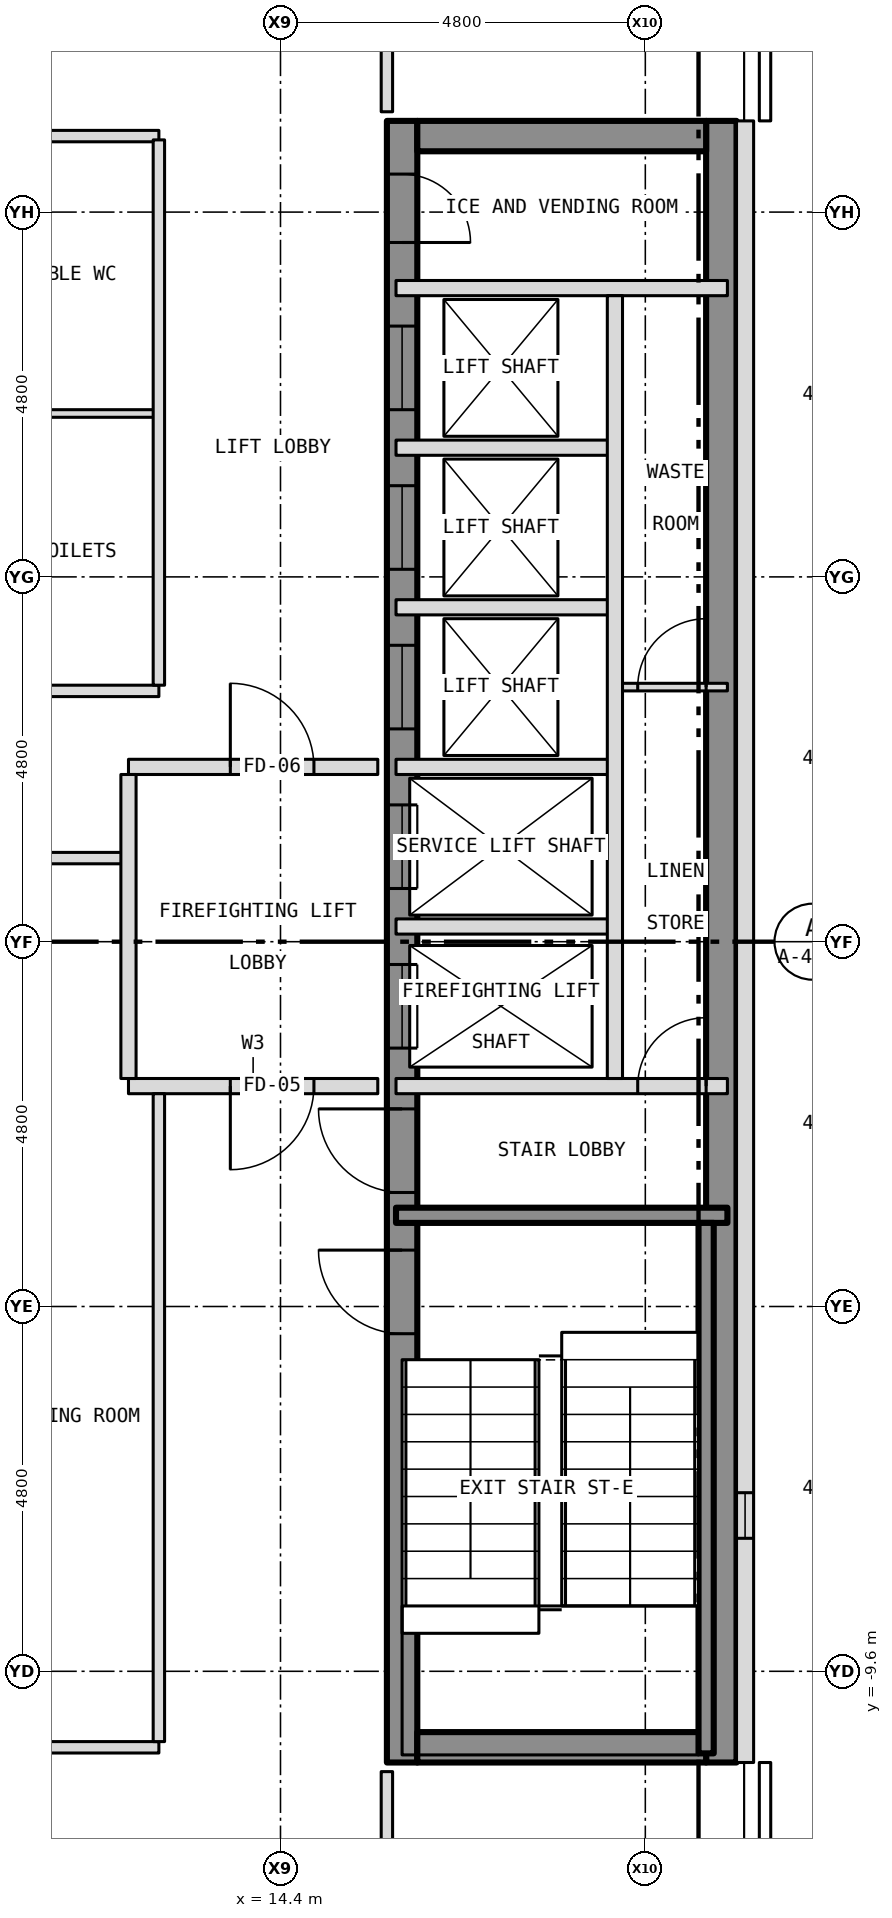
"""IFC4 building model, lengths in metres.
Left out: names, types, materials, properties, quantities, classifications, styles, units other than length and angle.
Written with IfcOpenShell. Run it as: python <this file> out.ifc"""

import sys

from ifc_helpers import new_model, si_unit, direction, frame, frame_2d, origin, place, context, subcontext, project, spatial, rectangle, extrude, element, fill, save


model = new_model("IFC4")
c1 = context("Model", 3, precision=1e-05, world=origin(), true_north=direction((0.0, 1.0)))
c2 = subcontext(c1, "Body", "Model", "MODEL_VIEW")
j1 = project(units=[si_unit("LENGTHUNIT", "METRE"), si_unit("PLANEANGLEUNIT", "RADIAN")], contexts=[c1])
p1 = place(None, origin())
s1 = spatial("IfcSite", under=j1, at=p1, CompositionType="ELEMENT")
p2 = place(p1, origin())
s2 = spatial("IfcBuilding", under=s1, at=p2, CompositionType="ELEMENT")
p3 = place(p2, frame((0.0, 0.0, 241.0)))
s3 = spatial("IfcBuildingStorey", under=s2, at=p3, CompositionType="ELEMENT", Elevation=241.0)
p4 = place(p3, frame((16.0, -10.8, 0.0), z_axis=(0.0, 0.0, 1.0), x_axis=(0.0, 1.0, 0.0)))
e1 = element("IfcWall", 1, at=p4, inside=s3, PredefinedType="SHEAR", context=c2, shape_type="SweptSolid", body=[
    extrude(rectangle(XDim=21.6, YDim=0.4, at=frame_2d((10.8, 0.0))), origin(), (0.0, 0.0, 1.0), 3.25),
])
p5 = place(p4, frame((9.4, 0.0, 0.0)))
e2 = element("IfcOpeningElement", 2, at=p5, cuts=e1, PredefinedType="OPENING", context=c2, shape_type="SweptSolid", body=[
    extrude(rectangle(XDim=1.1, YDim=2.1, at=frame_2d((0.55, 1.05))), frame((0.0, 0.212, 0.0), z_axis=(0.0, -1.0, 0.0), x_axis=(1.0, 0.0, 0.0)), (0.0, 0.0, 1.0), 0.424),
])
p6 = place(p4, frame((11.5, 0.0, 0.0)))
e3 = element("IfcOpeningElement", 3, at=p6, cuts=e1, PredefinedType="OPENING", context=c2, shape_type="SweptSolid", body=[
    extrude(rectangle(XDim=1.1, YDim=2.1, at=frame_2d((0.55, 1.05))), frame((0.0, 0.212, 0.0), z_axis=(0.0, -1.0, 0.0), x_axis=(1.0, 0.0, 0.0)), (0.0, 0.0, 1.0), 0.424),
])
p7 = place(p4, frame((13.6, 0.0, 0.0)))
e4 = element("IfcOpeningElement", 4, at=p7, cuts=e1, PredefinedType="OPENING", context=c2, shape_type="SweptSolid", body=[
    extrude(rectangle(XDim=1.1, YDim=2.1, at=frame_2d((0.55, 1.05))), frame((0.0, 0.212, 0.0), z_axis=(0.0, -1.0, 0.0), x_axis=(1.0, 0.0, 0.0)), (0.0, 0.0, 1.0), 0.424),
])
p8 = place(p4, frame((15.7, 0.0, 0.0)))
e5 = element("IfcOpeningElement", 5, at=p8, cuts=e1, PredefinedType="OPENING", context=c2, shape_type="SweptSolid", body=[
    extrude(rectangle(XDim=1.1, YDim=2.1, at=frame_2d((0.55, 1.05))), frame((0.0, 0.212, 0.0), z_axis=(0.0, -1.0, 0.0), x_axis=(1.0, 0.0, 0.0)), (0.0, 0.0, 1.0), 0.424),
])
p9 = place(p4, frame((17.8, 0.0, 0.0)))
e6 = element("IfcOpeningElement", 6, at=p9, cuts=e1, PredefinedType="OPENING", context=c2, shape_type="SweptSolid", body=[
    extrude(rectangle(XDim=1.1, YDim=2.1, at=frame_2d((0.55, 1.05))), frame((0.0, 0.212, 0.0), z_axis=(0.0, -1.0, 0.0), x_axis=(1.0, 0.0, 0.0)), (0.0, 0.0, 1.0), 0.424),
])
p10 = place(p4, frame((5.642, 0.0, 0.0)))
e7 = element("IfcOpeningElement", 7, at=p10, cuts=e1, PredefinedType="OPENING", context=c2, shape_type="SweptSolid", body=[
    extrude(rectangle(XDim=1.1, YDim=2.1, at=frame_2d((0.55, 1.05))), frame((0.0, 0.212, 0.0), z_axis=(0.0, -1.0, 0.0), x_axis=(1.0, 0.0, 0.0)), (0.0, 0.0, 1.0), 0.424),
])
p11 = place(p4, frame((7.5, 0.0, 0.0)))
e8 = element("IfcOpeningElement", 8, at=p11, cuts=e1, PredefinedType="OPENING", context=c2, shape_type="SweptSolid", body=[
    extrude(rectangle(XDim=1.1, YDim=2.1, at=frame_2d((0.55, 1.05))), frame((0.0, 0.212, 0.0), z_axis=(0.0, -1.0, 0.0), x_axis=(1.0, 0.0, 0.0)), (0.0, 0.0, 1.0), 0.424),
])
p12 = place(p4, frame((20.0, 0.0, 0.0)))
e9 = element("IfcOpeningElement", 9, at=p12, cuts=e1, PredefinedType="OPENING", context=c2, shape_type="SweptSolid", body=[
    extrude(rectangle(XDim=0.9, YDim=2.1, at=frame_2d((0.45, 1.05))), frame((0.0, 0.212, 0.0), z_axis=(0.0, -1.0, 0.0), x_axis=(1.0, 0.0, 0.0)), (0.0, 0.0, 1.0), 0.424),
])
p13 = place(p3, frame((20.2, -10.8, 0.0), z_axis=(0.0, 0.0, 1.0), x_axis=(0.0, 1.0, 0.0)))
e10 = element("IfcWall", 10, at=p13, inside=s3, PredefinedType="SHEAR", context=c2, shape_type="SweptSolid", body=[
    extrude(rectangle(XDim=21.6, YDim=0.4, at=frame_2d((10.8, 0.0))), origin(), (0.0, 0.0, 1.0), 3.25),
])
for number, where, z_axis, x_axis in (
    (11, (16.2, 10.6, 0.0), (0.0, 0.0, 1.0), (1.0, 0.0, 0.0)),
    (12, (16.2, -10.6, 0.0), (0.0, 0.0, 1.0), (1.0, 0.0, 0.0)),
):
    element("IfcWall", number, at=place(p3, frame(where, z_axis=z_axis, x_axis=x_axis)), inside=s3, PredefinedType="SHEAR", context=c2, shape_type="SweptSolid", body=[
        extrude(rectangle(XDim=3.8, YDim=0.4, at=frame_2d((1.9, 0.0))), origin(), (0.0, 0.0, 1.0), 3.25),
    ])
p14 = place(p3, frame((20.512, -10.8, 0.0), z_axis=(0.0, 0.0, 1.0), x_axis=(0.0, 1.0, 0.0)))
e13 = element("IfcWall", 13, at=p14, inside=s3, PredefinedType="SOLIDWALL", context=c2, shape_type="SweptSolid", body=[
    extrude(rectangle(XDim=21.6, YDim=0.225, at=frame_2d((10.8, 0.0))), origin(), (0.0, 0.0, 1.0), 3.5),
])
p15 = place(p14, frame((2.95, 0.0, 1.0)))
e14 = element("IfcOpeningElement", 14, at=p15, cuts=e13, PredefinedType="OPENING", context=c2, shape_type="SweptSolid", body=[
    extrude(rectangle(XDim=0.6, YDim=1.5, at=frame_2d((0.3, 0.75))), frame((0.0, 0.125, 0.0), z_axis=(0.0, -1.0, 0.0), x_axis=(1.0, 0.0, 0.0)), (0.0, 0.0, 1.0), 0.249),
])
p16 = place(p3, frame((9.7, -10.6, 0.0), z_axis=(0.0, 0.0, 1.0), x_axis=(1.0, 0.0, 0.0)))
e15 = element("IfcWall", 15, at=p16, inside=s3, PredefinedType="PARTITIONING", context=c2, shape_type="SweptSolid", body=[
    extrude(rectangle(XDim=3.1, YDim=0.15, at=frame_2d((1.55, 0.0))), origin(), (0.0, 0.0, 1.0), 3.35),
])
p17 = place(p3, frame((15.92, -3.6, 0.0), z_axis=(0.0, 0.0, 1.0), x_axis=(1.0, 0.0, 0.0)))
e16 = element("IfcWall", 16, at=p17, inside=s3, PredefinedType="SHEAR", context=c2, shape_type="SweptSolid", body=[
    extrude(rectangle(XDim=4.36, YDim=0.2, at=frame_2d((2.18, 0.0))), origin(), (0.0, 0.0, 1.0), 3.25),
])
p18 = place(p3, frame((12.4, -1.9, 0.0), z_axis=(0.0, 0.0, 1.0), x_axis=(1.0, 0.0, 0.0)))
e17 = element("IfcWall", 17, at=p18, inside=s3, PredefinedType="PARTITIONING", context=c2, shape_type="SweptSolid", body=[
    extrude(rectangle(XDim=3.28, YDim=0.2, at=frame_2d((1.64, 0.0))), origin(), (0.0, 0.0, 1.0), 3.35),
])
p19 = place(p18, frame((1.34, 0.0, 0.0)))
e18 = element("IfcOpeningElement", 18, at=p19, cuts=e17, PredefinedType="OPENING", context=c2, shape_type="SweptSolid", body=[
    extrude(rectangle(XDim=1.1, YDim=2.1, at=frame_2d((0.55, 1.05))), frame((0.0, 0.112, 0.0), z_axis=(0.0, -1.0, 0.0), x_axis=(1.0, 0.0, 0.0)), (0.0, 0.0, 1.0), 0.224),
])
p20 = place(p3, frame((15.92, -1.9, 0.0), z_axis=(0.0, 0.0, 1.0), x_axis=(1.0, 0.0, 0.0)))
e19 = element("IfcWall", 19, at=p20, inside=s3, PredefinedType="PARTITIONING", context=c2, shape_type="SweptSolid", body=[
    extrude(rectangle(XDim=4.36, YDim=0.2, at=frame_2d((2.18, 0.0))), origin(), (0.0, 0.0, 1.0), 3.25),
])
p21 = place(p20, frame((3.18, 0.0, 0.0)))
e20 = element("IfcOpeningElement", 20, at=p21, cuts=e19, PredefinedType="OPENING", context=c2, shape_type="SweptSolid", body=[
    extrude(rectangle(XDim=0.9, YDim=2.1, at=frame_2d((0.45, 1.05))), frame((0.0, 0.112, 0.0), z_axis=(0.0, -1.0, 0.0), x_axis=(1.0, 0.0, 0.0)), (0.0, 0.0, 1.0), 0.224),
])
p22 = place(p3, frame((15.92, 0.2, 0.0), z_axis=(0.0, 0.0, 1.0), x_axis=(1.0, 0.0, 0.0)))
e21 = element("IfcWall", 21, at=p22, inside=s3, PredefinedType="PARTITIONING", context=c2, shape_type="SweptSolid", body=[
    extrude(rectangle(XDim=2.88, YDim=0.2, at=frame_2d((1.44, 0.0))), origin(), (0.0, 0.0, 1.0), 3.25),
])
p23 = place(p3, frame((9.7, 1.1, 0.0), z_axis=(0.0, 0.0, 1.0), x_axis=(1.0, 0.0, 0.0)))
e22 = element("IfcWall", 22, at=p23, inside=s3, PredefinedType="PARTITIONING", context=c2, shape_type="SweptSolid", body=[
    extrude(rectangle(XDim=2.7, YDim=0.15, at=frame_2d((1.35, 0.0))), origin(), (0.0, 0.0, 1.0), 3.35),
])
p24 = place(p3, frame((12.4, 2.3, 0.0), z_axis=(0.0, 0.0, 1.0), x_axis=(1.0, 0.0, 0.0)))
e23 = element("IfcWall", 23, at=p24, inside=s3, PredefinedType="PARTITIONING", context=c2, shape_type="SweptSolid", body=[
    extrude(rectangle(XDim=3.28, YDim=0.2, at=frame_2d((1.64, 0.0))), origin(), (0.0, 0.0, 1.0), 3.35),
])
p25 = place(p24, frame((1.34, 0.0, 0.0)))
e24 = element("IfcOpeningElement", 24, at=p25, cuts=e23, PredefinedType="OPENING", context=c2, shape_type="SweptSolid", body=[
    extrude(rectangle(XDim=1.1, YDim=2.1, at=frame_2d((0.55, 1.05))), frame((0.0, 0.112, 0.0), z_axis=(0.0, -1.0, 0.0), x_axis=(1.0, 0.0, 0.0)), (0.0, 0.0, 1.0), 0.224),
])
p26 = place(p3, frame((15.92, 2.3, 0.0), z_axis=(0.0, 0.0, 1.0), x_axis=(1.0, 0.0, 0.0)))
e25 = element("IfcWall", 25, at=p26, inside=s3, PredefinedType="PARTITIONING", context=c2, shape_type="SweptSolid", body=[
    extrude(rectangle(XDim=2.88, YDim=0.2, at=frame_2d((1.44, 0.0))), origin(), (0.0, 0.0, 1.0), 3.25),
])
p27 = place(p3, frame((9.7, 3.3, 0.0), z_axis=(0.0, 0.0, 1.0), x_axis=(1.0, 0.0, 0.0)))
e26 = element("IfcWall", 26, at=p27, inside=s3, PredefinedType="PARTITIONING", context=c2, shape_type="SweptSolid", body=[
    extrude(rectangle(XDim=3.1, YDim=0.15, at=frame_2d((1.55, 0.0))), origin(), (0.0, 0.0, 1.0), 3.35),
])
p28 = place(p3, frame((18.8, 3.35, 0.0), z_axis=(0.0, 0.0, 1.0), x_axis=(1.0, 0.0, 0.0)))
e27 = element("IfcWall", 27, at=p28, inside=s3, PredefinedType="PARTITIONING", context=c2, shape_type="SweptSolid", body=[
    extrude(rectangle(XDim=1.48, YDim=0.1, at=frame_2d((0.74, 0.0))), origin(), (0.0, 0.0, 1.0), 3.25),
])
p29 = place(p28, frame((0.3, 0.0, 0.0)))
e28 = element("IfcOpeningElement", 28, at=p29, cuts=e27, PredefinedType="OPENING", context=c2, shape_type="SweptSolid", body=[
    extrude(rectangle(XDim=0.9, YDim=2.1, at=frame_2d((0.45, 1.05))), frame((0.0, 0.062, 0.0), z_axis=(0.0, -1.0, 0.0), x_axis=(1.0, 0.0, 0.0)), (0.0, 0.0, 1.0), 0.124),
])
for number, where, z_axis, x_axis in (
    (29, (15.92, 4.4, 0.0), (0.0, 0.0, 1.0), (1.0, 0.0, 0.0)),
    (30, (15.92, 6.5, 0.0), (0.0, 0.0, 1.0), (1.0, 0.0, 0.0)),
):
    element("IfcWall", number, at=place(p3, frame(where, z_axis=z_axis, x_axis=x_axis)), inside=s3, PredefinedType="PARTITIONING", context=c2, shape_type="SweptSolid", body=[
        extrude(rectangle(XDim=2.88, YDim=0.2, at=frame_2d((1.44, 0.0))), origin(), (0.0, 0.0, 1.0), 3.25),
    ])
p30 = place(p3, frame((9.7, 6.95, 0.0), z_axis=(0.0, 0.0, 1.0), x_axis=(1.0, 0.0, 0.0)))
e31 = element("IfcWall", 31, at=p30, inside=s3, PredefinedType="PARTITIONING", context=c2, shape_type="SweptSolid", body=[
    extrude(rectangle(XDim=3.1, YDim=0.1, at=frame_2d((1.55, 0.0))), origin(), (0.0, 0.0, 1.0), 3.35),
])
p31 = place(p3, frame((15.92, 8.6, 0.0), z_axis=(0.0, 0.0, 1.0), x_axis=(1.0, 0.0, 0.0)))
e32 = element("IfcWall", 32, at=p31, inside=s3, PredefinedType="PARTITIONING", context=c2, shape_type="SweptSolid", body=[
    extrude(rectangle(XDim=4.36, YDim=0.2, at=frame_2d((2.18, 0.0))), origin(), (0.0, 0.0, 1.0), 3.25),
])
p32 = place(p3, frame((9.7, 10.6, 0.0), z_axis=(0.0, 0.0, 1.0), x_axis=(1.0, 0.0, 0.0)))
e33 = element("IfcWall", 33, at=p32, inside=s3, PredefinedType="PARTITIONING", context=c2, shape_type="SweptSolid", body=[
    extrude(rectangle(XDim=3.1, YDim=0.15, at=frame_2d((1.55, 0.0))), origin(), (0.0, 0.0, 1.0), 3.35),
])
p33 = place(p3, frame((12.4, -1.8, 0.0), z_axis=(0.0, 0.0, 1.0), x_axis=(0.0, 1.0, 0.0)))
e34 = element("IfcWall", 34, at=p33, inside=s3, PredefinedType="PARTITIONING", context=c2, shape_type="SweptSolid", body=[
    extrude(rectangle(XDim=4.0, YDim=0.2, at=frame_2d((2.0, 0.0))), origin(), (0.0, 0.0, 1.0), 3.35),
])
p34 = place(p3, frame((12.8, -10.525, 0.0), z_axis=(0.0, 0.0, 1.0), x_axis=(0.0, 1.0, 0.0)))
e35 = element("IfcWall", 35, at=p34, inside=s3, PredefinedType="PARTITIONING", context=c2, shape_type="SweptSolid", body=[
    extrude(rectangle(XDim=8.525, YDim=0.15, at=frame_2d((4.262, 0.0))), origin(), (0.0, 0.0, 1.0), 3.35),
])
p35 = place(p3, frame((12.8, 3.375, 0.0), z_axis=(0.0, 0.0, 1.0), x_axis=(0.0, 1.0, 0.0)))
e36 = element("IfcWall", 36, at=p35, inside=s3, PredefinedType="PARTITIONING", context=c2, shape_type="SweptSolid", body=[
    extrude(rectangle(XDim=7.175, YDim=0.15, at=frame_2d((3.587, 0.0))), origin(), (0.0, 0.0, 1.0), 3.35),
])
for number, where, z_axis, x_axis in (
    (37, (15.8, -12.725, 0.0), (0.0, 0.0, 1.0), (0.0, 1.0, 0.0)),
    (38, (15.8, 10.92, 0.0), (0.0, 0.0, 1.0), (0.0, 1.0, 0.0)),
):
    element("IfcWall", number, at=place(p3, frame(where, z_axis=z_axis, x_axis=x_axis)), inside=s3, PredefinedType="PARTITIONING", context=c2, shape_type="SweptSolid", body=[
        extrude(rectangle(XDim=1.805, YDim=0.15, at=frame_2d((0.903, 0.0))), origin(), (0.0, 0.0, 1.0), 3.35),
    ])
p36 = place(p3, frame((18.8, -1.8, 0.0), z_axis=(0.0, 0.0, 1.0), x_axis=(0.0, 1.0, 0.0)))
e39 = element("IfcWall", 39, at=p36, inside=s3, PredefinedType="PARTITIONING", context=c2, shape_type="SweptSolid", body=[
    extrude(rectangle(XDim=10.3, YDim=0.2, at=frame_2d((5.15, 0.0))), origin(), (0.0, 0.0, 1.0), 3.25),
])
p37 = place(p3, frame((20.0, -10.68, 0.0), z_axis=(0.0, 0.0, 1.0), x_axis=(0.0, 1.0, 0.0)))
e40 = element("IfcWall", 40, at=p37, inside=s3, PredefinedType="SHEAR", context=c2, shape_type="SweptSolid", body=[
    extrude(rectangle(XDim=6.98, YDim=0.2, at=frame_2d((3.49, 0.0))), origin(), (0.0, 0.0, 1.0), 3.25),
])
p38 = place(p15, origin())
e41 = element("IfcWindow", 41, at=p38, inside=s3, PartitioningType="SINGLE_PANEL", PredefinedType="WINDOW", context=c2, shape_type="SweptSolid", body=[
    extrude(rectangle(XDim=0.6, YDim=1.5, at=frame_2d((0.3, 0.75))), frame((0.0, -0.022, 0.0), z_axis=(0.0, -1.0, 0.0), x_axis=(1.0, 0.0, 0.0)), (0.0, 0.0, 1.0), 0.06),
])
fill(e14, e41)
p39 = place(p5, origin())
e42 = element("IfcDoor", 42, at=p39, inside=s3, OperationType="SLIDING_TO_LEFT", PredefinedType="DOOR", context=c2, shape_type="SweptSolid", body=[
    extrude(rectangle(XDim=1.1, YDim=2.1, at=frame_2d((0.55, 1.05))), frame((0.0, 0.025, 0.0), z_axis=(0.0, -1.0, 0.0), x_axis=(1.0, 0.0, 0.0)), (0.0, 0.0, 1.0), 0.05),
])
fill(e2, e42)
p40 = place(p6, origin())
e43 = element("IfcDoor", 43, at=p40, inside=s3, OperationType="SLIDING_TO_LEFT", PredefinedType="DOOR", context=c2, shape_type="SweptSolid", body=[
    extrude(rectangle(XDim=1.1, YDim=2.1, at=frame_2d((0.55, 1.05))), frame((0.0, 0.025, 0.0), z_axis=(0.0, -1.0, 0.0), x_axis=(1.0, 0.0, 0.0)), (0.0, 0.0, 1.0), 0.05),
])
fill(e3, e43)
p41 = place(p7, origin())
e44 = element("IfcDoor", 44, at=p41, inside=s3, OperationType="SLIDING_TO_LEFT", PredefinedType="DOOR", context=c2, shape_type="SweptSolid", body=[
    extrude(rectangle(XDim=1.1, YDim=2.1, at=frame_2d((0.55, 1.05))), frame((0.0, 0.025, 0.0), z_axis=(0.0, -1.0, 0.0), x_axis=(1.0, 0.0, 0.0)), (0.0, 0.0, 1.0), 0.05),
])
fill(e4, e44)
p42 = place(p8, origin())
e45 = element("IfcDoor", 45, at=p42, inside=s3, OperationType="SLIDING_TO_LEFT", PredefinedType="DOOR", context=c2, shape_type="SweptSolid", body=[
    extrude(rectangle(XDim=1.1, YDim=2.1, at=frame_2d((0.55, 1.05))), frame((0.0, 0.025, 0.0), z_axis=(0.0, -1.0, 0.0), x_axis=(1.0, 0.0, 0.0)), (0.0, 0.0, 1.0), 0.05),
])
fill(e5, e45)
p43 = place(p9, origin())
e46 = element("IfcDoor", 46, at=p43, inside=s3, OperationType="SLIDING_TO_LEFT", PredefinedType="DOOR", context=c2, shape_type="SweptSolid", body=[
    extrude(rectangle(XDim=1.1, YDim=2.1, at=frame_2d((0.55, 1.05))), frame((0.0, 0.025, 0.0), z_axis=(0.0, -1.0, 0.0), x_axis=(1.0, 0.0, 0.0)), (0.0, 0.0, 1.0), 0.05),
])
fill(e6, e46)
p44 = place(p10, origin())
e47 = element("IfcDoor", 47, at=p44, inside=s3, OperationType="SINGLE_SWING_RIGHT", PredefinedType="DOOR", context=c2, shape_type="SweptSolid", body=[
    extrude(rectangle(XDim=1.1, YDim=2.1, at=frame_2d((0.55, 1.05))), frame((0.0, 0.025, 0.0), z_axis=(0.0, -1.0, 0.0), x_axis=(1.0, 0.0, 0.0)), (0.0, 0.0, 1.0), 0.05),
])
fill(e7, e47)
p45 = place(p11, origin())
e48 = element("IfcDoor", 48, at=p45, inside=s3, OperationType="SINGLE_SWING_RIGHT", PredefinedType="DOOR", context=c2, shape_type="SweptSolid", body=[
    extrude(rectangle(XDim=1.1, YDim=2.1, at=frame_2d((0.55, 1.05))), frame((0.0, 0.025, 0.0), z_axis=(0.0, -1.0, 0.0), x_axis=(1.0, 0.0, 0.0)), (0.0, 0.0, 1.0), 0.05),
])
fill(e8, e48)
p46 = place(p12, origin())
e49 = element("IfcDoor", 49, at=p46, inside=s3, OperationType="SINGLE_SWING_LEFT", PredefinedType="DOOR", context=c2, shape_type="SweptSolid", body=[
    extrude(rectangle(XDim=0.9, YDim=2.1, at=frame_2d((0.45, 1.05))), frame((0.0, 0.025, 0.0), z_axis=(0.0, -1.0, 0.0), x_axis=(1.0, 0.0, 0.0)), (0.0, 0.0, 1.0), 0.05),
])
fill(e9, e49)
p47 = place(p21, origin())
e50 = element("IfcDoor", 50, at=p47, inside=s3, OperationType="SINGLE_SWING_RIGHT", PredefinedType="DOOR", context=c2, shape_type="SweptSolid", body=[
    extrude(rectangle(XDim=0.9, YDim=2.1, at=frame_2d((0.45, 1.05))), frame((0.0, 0.025, 0.0), z_axis=(0.0, -1.0, 0.0), x_axis=(1.0, 0.0, 0.0)), (0.0, 0.0, 1.0), 0.05),
])
fill(e20, e50)
p48 = place(p29, origin())
e51 = element("IfcDoor", 51, at=p48, inside=s3, OperationType="SINGLE_SWING_RIGHT", PredefinedType="DOOR", context=c2, shape_type="SweptSolid", body=[
    extrude(rectangle(XDim=0.9, YDim=2.1, at=frame_2d((0.45, 1.05))), frame((0.0, 0.025, 0.0), z_axis=(0.0, -1.0, 0.0), x_axis=(1.0, 0.0, 0.0)), (0.0, 0.0, 1.0), 0.05),
])
fill(e28, e51)
p49 = place(p19, origin())
e52 = element("IfcDoor", 52, at=p49, inside=s3, OperationType="SINGLE_SWING_LEFT", PredefinedType="DOOR", context=c2, shape_type="SweptSolid", body=[
    extrude(rectangle(XDim=1.1, YDim=2.1, at=frame_2d((0.55, 1.05))), frame((0.0, 0.025, 0.0), z_axis=(0.0, -1.0, 0.0), x_axis=(1.0, 0.0, 0.0)), (0.0, 0.0, 1.0), 0.05),
])
fill(e18, e52)
p50 = place(p25, origin())
e53 = element("IfcDoor", 53, at=p50, inside=s3, OperationType="SINGLE_SWING_LEFT", PredefinedType="DOOR", context=c2, shape_type="SweptSolid", body=[
    extrude(rectangle(XDim=1.1, YDim=2.1, at=frame_2d((0.55, 1.05))), frame((0.0, 0.025, 0.0), z_axis=(0.0, -1.0, 0.0), x_axis=(1.0, 0.0, 0.0)), (0.0, 0.0, 1.0), 0.05),
])
fill(e24, e53)
save(model, sys.argv[1])
